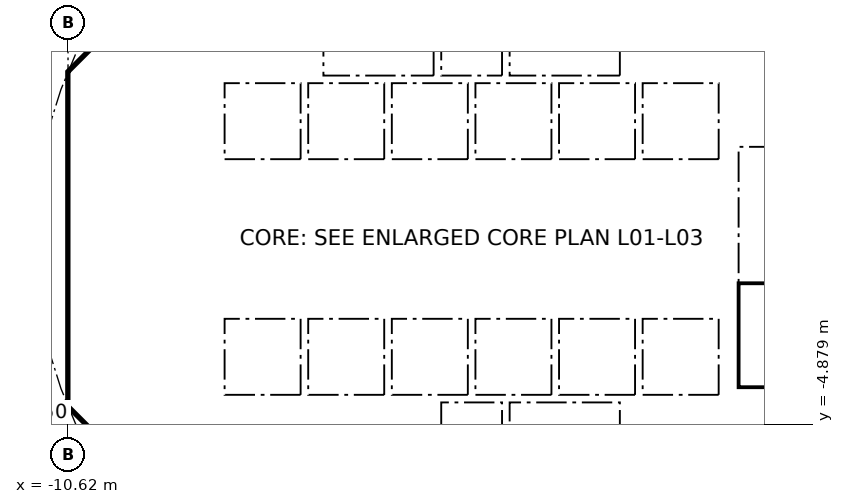
"""IFC4 building model, lengths in metres.
Left out: names, types, materials, properties, quantities, classifications, styles, units other than length and angle.
Written with IfcOpenShell. Run it as: python <this file> out.ifc"""

import sys

from ifc_helpers import new_model, si_unit, direction, frame, frame_2d, origin, place, context, subcontext, project, spatial, polyline, rectangle, outline, extrude, element, fill, save


model = new_model("IFC4")
c1 = context("Model", 3, precision=1e-05, world=origin(), true_north=direction((0.0, 1.0)))
c2 = subcontext(c1, "Body", "Model", "MODEL_VIEW")
j1 = project(units=[si_unit("LENGTHUNIT", "METRE"), si_unit("PLANEANGLEUNIT", "RADIAN")], contexts=[c1])
p1 = place(None, origin())
s1 = spatial("IfcSite", under=j1, at=p1, CompositionType="ELEMENT")
p2 = place(p1, origin())
s2 = spatial("IfcBuilding", under=s1, at=p2, CompositionType="ELEMENT")
p3 = place(p2, frame((0.0, 0.0, 7.0)))
s3 = spatial("IfcBuildingStorey", under=s2, at=p3, CompositionType="ELEMENT", Elevation=7.0)
p4 = place(p3, frame((9.988, 4.613, 0.0), z_axis=(0.0, 0.0, 1.0), x_axis=(-0.707106781187, 0.707106781187, 0.0)))
e1 = element("IfcWall", 1, at=p4, inside=s3, PredefinedType="SHEAR", context=c2, shape_type="SweptSolid", body=[
    extrude(rectangle(XDim=7.602, YDim=0.6, at=frame_2d((3.801, 0.0))), origin(), (0.0, 0.0, 1.0), 4.7),
])
p5 = place(p4, frame((3.201, 0.0, 0.0)))
e2 = element("IfcOpeningElement", 2, at=p5, cuts=e1, PredefinedType="OPENING", context=c2, shape_type="SweptSolid", body=[
    extrude(rectangle(XDim=1.2, YDim=2.1, at=frame_2d((0.6, 1.05))), frame((0.0, 0.31, 0.0), z_axis=(0.0, -1.0, 0.0), x_axis=(1.0, 0.0, 0.0)), (0.0, 0.0, 1.0), 0.62),
])
p6 = place(p3, frame((-4.613, 9.988, 0.0), z_axis=(0.0, 0.0, 1.0), x_axis=(-0.707106781187, -0.707106781187, 0.0)))
e3 = element("IfcWall", 3, at=p6, inside=s3, PredefinedType="SHEAR", context=c2, shape_type="SweptSolid", body=[
    extrude(rectangle(XDim=7.602, YDim=0.6, at=frame_2d((3.801, 0.0))), origin(), (0.0, 0.0, 1.0), 4.7),
])
p7 = place(p6, frame((0.351, 0.0, 0.0)))
e4 = element("IfcOpeningElement", 4, at=p7, cuts=e3, PredefinedType="OPENING", context=c2, shape_type="SweptSolid", body=[
    extrude(rectangle(XDim=1.1, YDim=2.1, at=frame_2d((0.55, 1.05))), frame((0.0, 0.31, 0.0), z_axis=(0.0, -1.0, 0.0), x_axis=(1.0, 0.0, 0.0)), (0.0, 0.0, 1.0), 0.62),
])
p8 = place(p3, frame((-10.325, 3.801, 0.0), z_axis=(0.0, 0.0, 1.0), x_axis=(0.0, -1.0, 0.0)))
e5 = element("IfcWall", 5, at=p8, inside=s3, PredefinedType="SHEAR", context=c2, shape_type="SweptSolid", body=[
    extrude(rectangle(XDim=7.602, YDim=0.6, at=frame_2d((3.801, 0.0))), origin(), (0.0, 0.0, 1.0), 4.7),
])
p9 = place(p8, frame((0.651, 0.0, 0.0)))
e6 = element("IfcOpeningElement", 6, at=p9, cuts=e5, PredefinedType="OPENING", context=c2, shape_type="SweptSolid", body=[
    extrude(rectangle(XDim=1.5, YDim=2.1, at=frame_2d((0.75, 1.05))), frame((0.0, 0.31, 0.0), z_axis=(0.0, -1.0, 0.0), x_axis=(1.0, 0.0, 0.0)), (0.0, 0.0, 1.0), 0.62),
])
p10 = place(p8, frame((5.451, 0.0, 0.0)))
e7 = element("IfcOpeningElement", 7, at=p10, cuts=e5, PredefinedType="OPENING", context=c2, shape_type="SweptSolid", body=[
    extrude(rectangle(XDim=1.5, YDim=2.1, at=frame_2d((0.75, 1.05))), frame((0.0, 0.31, 0.0), z_axis=(0.0, -1.0, 0.0), x_axis=(1.0, 0.0, 0.0)), (0.0, 0.0, 1.0), 0.62),
])
p11 = place(p3, frame((-9.988, -4.613, 0.0), z_axis=(0.0, 0.0, 1.0), x_axis=(0.707106781187, -0.707106781187, 0.0)))
e8 = element("IfcWall", 8, at=p11, inside=s3, PredefinedType="SHEAR", context=c2, shape_type="SweptSolid", body=[
    extrude(rectangle(XDim=7.602, YDim=0.6, at=frame_2d((3.801, 0.0))), origin(), (0.0, 0.0, 1.0), 4.7),
])
p12 = place(p11, frame((6.151, 0.0, 0.0)))
e9 = element("IfcOpeningElement", 9, at=p12, cuts=e8, PredefinedType="OPENING", context=c2, shape_type="SweptSolid", body=[
    extrude(rectangle(XDim=1.1, YDim=2.1, at=frame_2d((0.55, 1.05))), frame((0.0, 0.31, 0.0), z_axis=(0.0, -1.0, 0.0), x_axis=(1.0, 0.0, 0.0)), (0.0, 0.0, 1.0), 0.62),
])
p13 = place(p3, frame((4.613, -9.988, 0.0), z_axis=(0.0, 0.0, 1.0), x_axis=(0.707106781187, 0.707106781187, 0.0)))
e10 = element("IfcWall", 10, at=p13, inside=s3, PredefinedType="SHEAR", context=c2, shape_type="SweptSolid", body=[
    extrude(rectangle(XDim=7.602, YDim=0.6, at=frame_2d((3.801, 0.0))), origin(), (0.0, 0.0, 1.0), 4.7),
])
p14 = place(p13, frame((3.201, 0.0, 0.0)))
e11 = element("IfcOpeningElement", 11, at=p14, cuts=e10, PredefinedType="OPENING", context=c2, shape_type="SweptSolid", body=[
    extrude(rectangle(XDim=1.2, YDim=2.1, at=frame_2d((0.6, 1.05))), frame((0.0, 0.31, 0.0), z_axis=(0.0, -1.0, 0.0), x_axis=(1.0, 0.0, 0.0)), (0.0, 0.0, 1.0), 0.62),
])
p15 = place(p3, frame((-5.8, 4.3, 0.0), z_axis=(0.0, 0.0, 1.0), x_axis=(0.0, 1.0, 0.0)))
e12 = element("IfcWall", 12, at=p15, inside=s3, PredefinedType="PARTITIONING", context=c2, shape_type="SweptSolid", body=[
    extrude(rectangle(XDim=3.927, YDim=0.15, at=frame_2d((1.963, 0.0))), origin(), (0.0, 0.0, 1.0), 4.7),
])
p16 = place(p15, frame((1.551, 0.0, 0.0)))
e13 = element("IfcOpeningElement", 13, at=p16, cuts=e12, PredefinedType="OPENING", context=c2, shape_type="SweptSolid", body=[
    extrude(rectangle(XDim=0.9, YDim=2.1, at=frame_2d((0.45, 1.05))), frame((0.0, 0.085, 0.0), z_axis=(0.0, -1.0, 0.0), x_axis=(1.0, 0.0, 0.0)), (0.0, 0.0, 1.0), 0.17),
])
p17 = place(p3, frame((4.0, 4.3, 0.0), z_axis=(0.0, 0.0, 1.0), x_axis=(0.0, 1.0, 0.0)))
e14 = element("IfcWall", 14, at=p17, inside=s3, PredefinedType="SOLIDWALL", context=c2, shape_type="SweptSolid", body=[
    extrude(rectangle(XDim=2.2, YDim=0.2, at=frame_2d((1.1, 0.0))), origin(), (0.0, 0.0, 1.0), 4.7),
])
p18 = place(p17, frame((0.55, 0.0, 0.0)))
e15 = element("IfcOpeningElement", 15, at=p18, cuts=e14, PredefinedType="OPENING", context=c2, shape_type="SweptSolid", body=[
    extrude(rectangle(XDim=1.1, YDim=2.1, at=frame_2d((0.55, 1.05))), frame((0.0, 0.11, 0.0), z_axis=(0.0, -1.0, 0.0), x_axis=(1.0, 0.0, 0.0)), (0.0, 0.0, 1.0), 0.22),
])
p19 = place(p3, frame((-4.0, 4.3, 0.0), z_axis=(0.0, 0.0, 1.0), x_axis=(0.0, 1.0, 0.0)))
e16 = element("IfcWall", 16, at=p19, inside=s3, PredefinedType="SOLIDWALL", context=c2, shape_type="SweptSolid", body=[
    extrude(rectangle(XDim=2.2, YDim=0.2, at=frame_2d((1.1, 0.0))), origin(), (0.0, 0.0, 1.0), 4.7),
])
p20 = place(p19, frame((0.55, 0.0, 0.0)))
e17 = element("IfcOpeningElement", 17, at=p20, cuts=e16, PredefinedType="OPENING", context=c2, shape_type="SweptSolid", body=[
    extrude(rectangle(XDim=1.1, YDim=2.1, at=frame_2d((0.55, 1.05))), frame((0.0, 0.11, 0.0), z_axis=(0.0, -1.0, 0.0), x_axis=(1.0, 0.0, 0.0)), (0.0, 0.0, 1.0), 0.22),
])
p21 = place(p3, frame((-6.7, 2.0, 0.0), z_axis=(0.0, 0.0, 1.0), x_axis=(1.0, 0.0, 0.0)))
e18 = element("IfcWall", 18, at=p21, inside=s3, PredefinedType="SOLIDWALL", context=c2, shape_type="SweptSolid", body=[
    extrude(rectangle(XDim=13.4, YDim=0.2, at=frame_2d((6.7, 0.0))), origin(), (0.0, 0.0, 1.0), 4.7),
])
p22 = place(p21, frame((0.65, 0.0, 0.0)))
e19 = element("IfcOpeningElement", 19, at=p22, cuts=e18, PredefinedType="OPENING", context=c2, shape_type="SweptSolid", body=[
    extrude(rectangle(XDim=1.1, YDim=2.1, at=frame_2d((0.55, 1.05))), frame((0.0, 0.11, 0.0), z_axis=(0.0, -1.0, 0.0), x_axis=(1.0, 0.0, 0.0)), (0.0, 0.0, 1.0), 0.22),
])
p23 = place(p21, frame((2.85, 0.0, 0.0)))
e20 = element("IfcOpeningElement", 20, at=p23, cuts=e18, PredefinedType="OPENING", context=c2, shape_type="SweptSolid", body=[
    extrude(rectangle(XDim=1.1, YDim=2.1, at=frame_2d((0.55, 1.05))), frame((0.0, 0.11, 0.0), z_axis=(0.0, -1.0, 0.0), x_axis=(1.0, 0.0, 0.0)), (0.0, 0.0, 1.0), 0.22),
])
p24 = place(p21, frame((5.05, 0.0, 0.0)))
e21 = element("IfcOpeningElement", 21, at=p24, cuts=e18, PredefinedType="OPENING", context=c2, shape_type="SweptSolid", body=[
    extrude(rectangle(XDim=1.1, YDim=2.1, at=frame_2d((0.55, 1.05))), frame((0.0, 0.11, 0.0), z_axis=(0.0, -1.0, 0.0), x_axis=(1.0, 0.0, 0.0)), (0.0, 0.0, 1.0), 0.22),
])
p25 = place(p3, frame((6.7, 4.0, 0.0), z_axis=(0.0, 0.0, 1.0), x_axis=(1.0, 0.0, 0.0)))
e22 = element("IfcWall", 22, at=p25, inside=s3, PredefinedType="SOLIDWALL", context=c2, shape_type="SweptSolid", body=[
    extrude(rectangle(XDim=3.325, YDim=0.2, at=frame_2d((1.662, 0.0))), origin(), (0.0, 0.0, 1.0), 4.7),
])
p26 = place(p25, frame((1.25, 0.0, 0.0)))
e23 = element("IfcOpeningElement", 23, at=p26, cuts=e22, PredefinedType="OPENING", context=c2, shape_type="SweptSolid", body=[
    extrude(rectangle(XDim=1.1, YDim=2.1, at=frame_2d((0.55, 1.05))), frame((0.0, 0.11, 0.0), z_axis=(0.0, -1.0, 0.0), x_axis=(1.0, 0.0, 0.0)), (0.0, 0.0, 1.0), 0.22),
])
p27 = place(p3, frame((-5.8, -8.227, 0.0), z_axis=(0.0, 0.0, 1.0), x_axis=(0.0, 1.0, 0.0)))
e24 = element("IfcWall", 24, at=p27, inside=s3, PredefinedType="PARTITIONING", context=c2, shape_type="SweptSolid", body=[
    extrude(rectangle(XDim=3.927, YDim=0.15, at=frame_2d((1.963, 0.0))), origin(), (0.0, 0.0, 1.0), 4.7),
])
p28 = place(p27, frame((1.476, 0.0, 0.0)))
e25 = element("IfcOpeningElement", 25, at=p28, cuts=e24, PredefinedType="OPENING", context=c2, shape_type="SweptSolid", body=[
    extrude(rectangle(XDim=0.9, YDim=2.1, at=frame_2d((0.45, 1.05))), frame((0.0, 0.085, 0.0), z_axis=(0.0, -1.0, 0.0), x_axis=(1.0, 0.0, 0.0)), (0.0, 0.0, 1.0), 0.17),
])
p29 = place(p3, frame((4.0, -6.5, 0.0), z_axis=(0.0, 0.0, 1.0), x_axis=(0.0, 1.0, 0.0)))
e26 = element("IfcWall", 26, at=p29, inside=s3, PredefinedType="SOLIDWALL", context=c2, shape_type="SweptSolid", body=[
    extrude(rectangle(XDim=2.2, YDim=0.2, at=frame_2d((1.1, 0.0))), origin(), (0.0, 0.0, 1.0), 4.7),
])
p30 = place(p29, frame((0.55, 0.0, 0.0)))
e27 = element("IfcOpeningElement", 27, at=p30, cuts=e26, PredefinedType="OPENING", context=c2, shape_type="SweptSolid", body=[
    extrude(rectangle(XDim=1.1, YDim=2.1, at=frame_2d((0.55, 1.05))), frame((0.0, 0.11, 0.0), z_axis=(0.0, -1.0, 0.0), x_axis=(1.0, 0.0, 0.0)), (0.0, 0.0, 1.0), 0.22),
])
p31 = place(p3, frame((-4.0, -6.5, 0.0), z_axis=(0.0, 0.0, 1.0), x_axis=(0.0, 1.0, 0.0)))
e28 = element("IfcWall", 28, at=p31, inside=s3, PredefinedType="SOLIDWALL", context=c2, shape_type="SweptSolid", body=[
    extrude(rectangle(XDim=2.2, YDim=0.2, at=frame_2d((1.1, 0.0))), origin(), (0.0, 0.0, 1.0), 4.7),
])
p32 = place(p31, frame((0.65, 0.0, 0.0)))
e29 = element("IfcOpeningElement", 29, at=p32, cuts=e28, PredefinedType="OPENING", context=c2, shape_type="SweptSolid", body=[
    extrude(rectangle(XDim=0.9, YDim=2.1, at=frame_2d((0.45, 1.05))), frame((0.0, 0.11, 0.0), z_axis=(0.0, -1.0, 0.0), x_axis=(1.0, 0.0, 0.0)), (0.0, 0.0, 1.0), 0.22),
])
p33 = place(p3, frame((-6.7, -2.0, 0.0), z_axis=(0.0, 0.0, 1.0), x_axis=(1.0, 0.0, 0.0)))
e30 = element("IfcWall", 30, at=p33, inside=s3, PredefinedType="SOLIDWALL", context=c2, shape_type="SweptSolid", body=[
    extrude(rectangle(XDim=13.4, YDim=0.2, at=frame_2d((6.7, 0.0))), origin(), (0.0, 0.0, 1.0), 4.7),
])
p34 = place(p33, frame((0.65, 0.0, 0.0)))
e31 = element("IfcOpeningElement", 31, at=p34, cuts=e30, PredefinedType="OPENING", context=c2, shape_type="SweptSolid", body=[
    extrude(rectangle(XDim=1.1, YDim=2.1, at=frame_2d((0.55, 1.05))), frame((0.0, 0.11, 0.0), z_axis=(0.0, -1.0, 0.0), x_axis=(1.0, 0.0, 0.0)), (0.0, 0.0, 1.0), 0.22),
])
p35 = place(p33, frame((2.85, 0.0, 0.0)))
e32 = element("IfcOpeningElement", 32, at=p35, cuts=e30, PredefinedType="OPENING", context=c2, shape_type="SweptSolid", body=[
    extrude(rectangle(XDim=1.1, YDim=2.1, at=frame_2d((0.55, 1.05))), frame((0.0, 0.11, 0.0), z_axis=(0.0, -1.0, 0.0), x_axis=(1.0, 0.0, 0.0)), (0.0, 0.0, 1.0), 0.22),
])
p36 = place(p3, origin())
e33 = element("IfcWall", 33, at=p36, inside=s3, PredefinedType="SHEAR", context=c2, shape_type="SweptSolid", body=[
    extrude(outline(polyline([(-10.625, -3.801), (-10.025, -3.801), (-10.025, -4.152), (-9.776, -4.401), (-10.2, -4.825), (-10.625, -4.401), (-10.625, -3.801)])), origin(), (0.0, 0.0, 1.0), 4.7),
])
p37 = place(p3, origin())
e34 = element("IfcWall", 34, at=p37, inside=s3, PredefinedType="SHEAR", context=c2, shape_type="SweptSolid", body=[
    extrude(outline(polyline([(-10.2, 4.825), (-9.776, 4.401), (-10.025, 4.152), (-10.025, 3.801), (-10.625, 3.801), (-10.625, 4.401), (-10.2, 4.825)])), origin(), (0.0, 0.0, 1.0), 4.7),
])
for number, where, z_axis, x_axis in (
    (35, (-0.9, -6.5, 0.0), (0.0, 0.0, 1.0), (0.0, 1.0, 0.0)),
    (36, (0.9, -6.5, 0.0), (0.0, 0.0, 1.0), (0.0, 1.0, 0.0)),
):
    element("IfcWall", number, at=place(p3, frame(where, z_axis=z_axis, x_axis=x_axis)), inside=s3, PredefinedType="SOLIDWALL", context=c2, shape_type="SweptSolid", body=[
        extrude(rectangle(XDim=2.2, YDim=0.2, at=frame_2d((1.1, 0.0))), origin(), (0.0, 0.0, 1.0), 4.7),
    ])
p38 = place(p3, origin())
e37 = element("IfcWall", 37, at=p38, inside=s3, PredefinedType="SOLIDWALL", context=c2, shape_type="SweptSolid", body=[
    extrude(outline(polyline([(-6.7, -2.1), (-6.5, -2.1), (-6.5, -4.1), (-4.5, -4.1), (-4.5, -2.1), (-4.3, -2.1), (-4.3, -4.1), (-2.3, -4.1), (-2.3, -2.1), (-2.1, -2.1), (-2.1, -4.1), (-0.1, -4.1), (-0.1, -2.1), (0.1, -2.1), (0.1, -4.1), (2.1, -4.1), (2.1, -2.1), (2.3, -2.1), (2.3, -4.1), (4.3, -4.1), (4.3, -2.1), (4.5, -2.1), (4.5, -4.1), (6.5, -4.1), (6.5, -2.1), (6.7, -2.1), (6.7, -4.3), (-6.7, -4.3), (-6.7, -2.1)])), origin(), (0.0, 0.0, 1.0), 4.7),
])
for number, where, z_axis, x_axis in (
    (38, (-0.9, 4.3, 0.0), (0.0, 0.0, 1.0), (0.0, 1.0, 0.0)),
    (39, (0.9, 4.3, 0.0), (0.0, 0.0, 1.0), (0.0, 1.0, 0.0)),
):
    element("IfcWall", number, at=place(p3, frame(where, z_axis=z_axis, x_axis=x_axis)), inside=s3, PredefinedType="SOLIDWALL", context=c2, shape_type="SweptSolid", body=[
        extrude(rectangle(XDim=2.2, YDim=0.2, at=frame_2d((1.1, 0.0))), origin(), (0.0, 0.0, 1.0), 4.7),
    ])
p39 = place(p3, origin())
e40 = element("IfcWall", 40, at=p39, inside=s3, PredefinedType="SOLIDWALL", context=c2, shape_type="SweptSolid", body=[
    extrude(outline(polyline([(-6.5, 2.1), (-6.7, 2.1), (-6.7, 4.3), (6.7, 4.3), (6.7, 2.1), (6.5, 2.1), (6.5, 4.1), (4.5, 4.1), (4.5, 2.1), (4.3, 2.1), (4.3, 4.1), (2.3, 4.1), (2.3, 2.1), (2.1, 2.1), (2.1, 4.1), (0.1, 4.1), (0.1, 2.1), (-0.1, 2.1), (-0.1, 4.1), (-2.1, 4.1), (-2.1, 2.1), (-2.3, 2.1), (-2.3, 4.1), (-4.3, 4.1), (-4.3, 2.1), (-4.5, 2.1), (-4.5, 4.1), (-6.5, 4.1), (-6.5, 2.1)])), origin(), (0.0, 0.0, 1.0), 4.7),
])
for number, where, z_axis, x_axis in (
    (41, (-10.025, -4.0, 0.0), (0.0, 0.0, 1.0), (1.0, 0.0, 0.0)),
    (42, (-10.025, 4.0, 0.0), (0.0, 0.0, 1.0), (1.0, 0.0, 0.0)),
):
    element("IfcWall", number, at=place(p3, frame(where, z_axis=z_axis, x_axis=x_axis)), inside=s3, PredefinedType="PARTITIONING", context=c2, shape_type="SweptSolid", body=[
        extrude(rectangle(XDim=3.325, YDim=0.2, at=frame_2d((1.662, 0.0))), origin(), (0.0, 0.0, 1.0), 4.7),
    ])
p40 = place(p3, origin())
e43 = element("IfcWall", 43, at=p40, inside=s3, PredefinedType="SOLIDWALL", context=c2, shape_type="SweptSolid", body=[
    extrude(outline(polyline([(7.025, -3.9), (6.7, -3.9), (6.7, 3.9), (7.025, 3.9), (7.025, -3.9)])), origin(), (0.0, 0.0, 1.0), 4.7),
])
p41 = place(p3, origin())
e44 = element("IfcWall", 44, at=p41, inside=s3, PredefinedType="SOLIDWALL", context=c2, shape_type="SweptSolid", body=[
    extrude(outline(polyline([(10.025, -4.1), (6.7, -4.1), (6.7, -3.9), (10.025, -3.9), (10.025, -4.1)])), origin(), (0.0, 0.0, 1.0), 4.7),
])
p42 = place(p22, origin())
e45 = element("IfcDoor", 45, at=p42, inside=s3, OperationType="DOUBLE_DOOR_SLIDING", PredefinedType="DOOR", context=c2, shape_type="SweptSolid", body=[
    extrude(rectangle(XDim=1.1, YDim=2.1, at=frame_2d((0.55, 1.05))), frame((0.0, 0.025, 0.0), z_axis=(0.0, -1.0, 0.0), x_axis=(1.0, 0.0, 0.0)), (0.0, 0.0, 1.0), 0.05),
])
fill(e19, e45)
p43 = place(p23, origin())
e46 = element("IfcDoor", 46, at=p43, inside=s3, OperationType="DOUBLE_DOOR_SLIDING", PredefinedType="DOOR", context=c2, shape_type="SweptSolid", body=[
    extrude(rectangle(XDim=1.1, YDim=2.1, at=frame_2d((0.55, 1.05))), frame((0.0, 0.025, 0.0), z_axis=(0.0, -1.0, 0.0), x_axis=(1.0, 0.0, 0.0)), (0.0, 0.0, 1.0), 0.05),
])
fill(e20, e46)
p44 = place(p24, origin())
e47 = element("IfcDoor", 47, at=p44, inside=s3, OperationType="DOUBLE_DOOR_SLIDING", PredefinedType="DOOR", context=c2, shape_type="SweptSolid", body=[
    extrude(rectangle(XDim=1.1, YDim=2.1, at=frame_2d((0.55, 1.05))), frame((0.0, 0.025, 0.0), z_axis=(0.0, -1.0, 0.0), x_axis=(1.0, 0.0, 0.0)), (0.0, 0.0, 1.0), 0.05),
])
fill(e21, e47)
p45 = place(p34, origin())
e48 = element("IfcDoor", 48, at=p45, inside=s3, OperationType="DOUBLE_DOOR_SLIDING", PredefinedType="DOOR", context=c2, shape_type="SweptSolid", body=[
    extrude(rectangle(XDim=1.1, YDim=2.1, at=frame_2d((0.55, 1.05))), frame((0.0, 0.025, 0.0), z_axis=(0.0, -1.0, 0.0), x_axis=(1.0, 0.0, 0.0)), (0.0, 0.0, 1.0), 0.05),
])
fill(e31, e48)
p46 = place(p35, origin())
e49 = element("IfcDoor", 49, at=p46, inside=s3, OperationType="DOUBLE_DOOR_SLIDING", PredefinedType="DOOR", context=c2, shape_type="SweptSolid", body=[
    extrude(rectangle(XDim=1.1, YDim=2.1, at=frame_2d((0.55, 1.05))), frame((0.0, 0.025, 0.0), z_axis=(0.0, -1.0, 0.0), x_axis=(1.0, 0.0, 0.0)), (0.0, 0.0, 1.0), 0.05),
])
fill(e32, e49)
p47 = place(p18, origin())
e50 = element("IfcDoor", 50, at=p47, inside=s3, OperationType="DOUBLE_DOOR_SLIDING", PredefinedType="DOOR", context=c2, shape_type="SweptSolid", body=[
    extrude(rectangle(XDim=1.1, YDim=2.1, at=frame_2d((0.55, 1.05))), frame((0.0, 0.025, 0.0), z_axis=(0.0, -1.0, 0.0), x_axis=(1.0, 0.0, 0.0)), (0.0, 0.0, 1.0), 0.05),
])
fill(e15, e50)
p48 = place(p30, origin())
e51 = element("IfcDoor", 51, at=p48, inside=s3, OperationType="DOUBLE_DOOR_SLIDING", PredefinedType="DOOR", context=c2, shape_type="SweptSolid", body=[
    extrude(rectangle(XDim=1.1, YDim=2.1, at=frame_2d((0.55, 1.05))), frame((0.0, 0.025, 0.0), z_axis=(0.0, -1.0, 0.0), x_axis=(1.0, 0.0, 0.0)), (0.0, 0.0, 1.0), 0.05),
])
fill(e27, e51)
p49 = place(p20, origin())
e52 = element("IfcDoor", 52, at=p49, inside=s3, OperationType="DOUBLE_DOOR_SLIDING", PredefinedType="DOOR", context=c2, shape_type="SweptSolid", body=[
    extrude(rectangle(XDim=1.1, YDim=2.1, at=frame_2d((0.55, 1.05))), frame((0.0, 0.025, 0.0), z_axis=(0.0, -1.0, 0.0), x_axis=(1.0, 0.0, 0.0)), (0.0, 0.0, 1.0), 0.05),
])
fill(e17, e52)
p50 = place(p9, origin())
e53 = element("IfcDoor", 53, at=p50, inside=s3, OperationType="DOUBLE_DOOR_SINGLE_SWING", PredefinedType="DOOR", context=c2, shape_type="SweptSolid", body=[
    extrude(rectangle(XDim=1.5, YDim=2.1, at=frame_2d((0.75, 1.05))), frame((0.0, 0.025, 0.0), z_axis=(0.0, -1.0, 0.0), x_axis=(1.0, 0.0, 0.0)), (0.0, 0.0, 1.0), 0.05),
])
fill(e6, e53)
p51 = place(p10, origin())
e54 = element("IfcDoor", 54, at=p51, inside=s3, OperationType="DOUBLE_DOOR_SINGLE_SWING", PredefinedType="DOOR", context=c2, shape_type="SweptSolid", body=[
    extrude(rectangle(XDim=1.5, YDim=2.1, at=frame_2d((0.75, 1.05))), frame((0.0, 0.025, 0.0), z_axis=(0.0, -1.0, 0.0), x_axis=(1.0, 0.0, 0.0)), (0.0, 0.0, 1.0), 0.05),
])
fill(e7, e54)
save(model, sys.argv[1])
